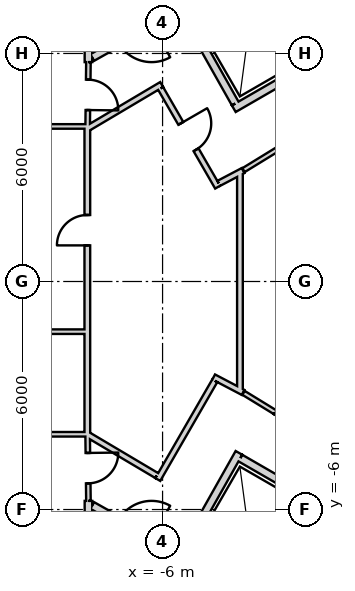
"""IFC4 building model, lengths in metres.
Left out: names, types, materials, properties, quantities, classifications, styles, units other than length and angle.
Written with IfcOpenShell. Run it as: python <this file> out.ifc"""

import sys

from ifc_helpers import new_model, si_unit, direction, frame, frame_2d, origin, place, context, subcontext, project, spatial, rectangle, extrude, element, fill, save


model = new_model("IFC4")
c1 = context("Model", 3, precision=1e-05, world=origin(), true_north=direction((0.0, 1.0)))
c2 = subcontext(c1, "Body", "Model", "MODEL_VIEW")
j1 = project(units=[si_unit("LENGTHUNIT", "METRE"), si_unit("PLANEANGLEUNIT", "RADIAN")], contexts=[c1])
p1 = place(None, origin())
s1 = spatial("IfcSite", under=j1, at=p1, CompositionType="ELEMENT")
p2 = place(p1, origin())
s2 = spatial("IfcBuilding", under=s1, at=p2, CompositionType="ELEMENT")
p3 = place(p2, frame((0.0, 0.0, -11.0)))
s3 = spatial("IfcBuildingStorey", under=s2, at=p3, CompositionType="ELEMENT", Elevation=-11.0)
p4 = place(p3, frame((19.475, 2.208, -0.4), z_axis=(0.0, 0.0, 1.0), x_axis=(-0.866028369851, 0.499994862586, 0.0)))
e1 = element("IfcWall", 1, at=p4, inside=s3, PredefinedType="SHEAR", context=c2, shape_type="SweptSolid", body=[
    extrude(rectangle(XDim=31.523, YDim=0.9, at=frame_2d((15.762, 0.0))), origin(), (0.0, 0.0, 1.0), 5.9),
])
p5 = place(p4, frame((3.612, 0.0, 0.4)))
e2 = element("IfcOpeningElement", 2, at=p5, cuts=e1, PredefinedType="OPENING", context=c2, shape_type="SweptSolid", body=[
    extrude(rectangle(XDim=1.2, YDim=2.4, at=frame_2d((0.6, 1.2))), frame((0.0, 0.46, 0.0), z_axis=(0.0, -1.0, 0.0), x_axis=(1.0, 0.0, 0.0)), (0.0, 0.0, 1.0), 0.92),
])
p6 = place(p4, frame((26.712, 0.0, 0.4)))
e3 = element("IfcOpeningElement", 3, at=p6, cuts=e1, PredefinedType="OPENING", context=c2, shape_type="SweptSolid", body=[
    extrude(rectangle(XDim=1.2, YDim=2.4, at=frame_2d((0.6, 1.2))), frame((0.0, 0.46, 0.0), z_axis=(0.0, -1.0, 0.0), x_axis=(1.0, 0.0, 0.0)), (0.0, 0.0, 1.0), 0.92),
])
p7 = place(p3, frame((-7.825, -17.97, -0.4), z_axis=(0.0, 0.0, 1.0), x_axis=(0.866028369851, 0.499994862586, 0.0)))
e4 = element("IfcWall", 4, at=p7, inside=s3, PredefinedType="SHEAR", context=c2, shape_type="SweptSolid", body=[
    extrude(rectangle(XDim=31.523, YDim=0.9, at=frame_2d((15.762, 0.0))), origin(), (0.0, 0.0, 1.0), 5.9),
])
p8 = place(p7, frame((17.862, 0.0, 0.4)))
e5 = element("IfcOpeningElement", 5, at=p8, cuts=e4, PredefinedType="OPENING", context=c2, shape_type="SweptSolid", body=[
    extrude(rectangle(XDim=1.2, YDim=2.4, at=frame_2d((0.6, 1.2))), frame((0.0, 0.46, 0.0), z_axis=(0.0, -1.0, 0.0), x_axis=(1.0, 0.0, 0.0)), (0.0, 0.0, 1.0), 0.92),
])
p9 = place(p7, frame((20.562, 0.0, 0.4)))
e6 = element("IfcOpeningElement", 6, at=p9, cuts=e4, PredefinedType="OPENING", context=c2, shape_type="SweptSolid", body=[
    extrude(rectangle(XDim=1.2, YDim=2.4, at=frame_2d((0.6, 1.2))), frame((0.0, 0.46, 0.0), z_axis=(0.0, -1.0, 0.0), x_axis=(1.0, 0.0, 0.0)), (0.0, 0.0, 1.0), 0.92),
])
p10 = place(p7, frame((26.712, 0.0, 0.4)))
e7 = element("IfcOpeningElement", 7, at=p10, cuts=e4, PredefinedType="OPENING", context=c2, shape_type="SweptSolid", body=[
    extrude(rectangle(XDim=1.2, YDim=2.4, at=frame_2d((0.6, 1.2))), frame((0.0, 0.46, 0.0), z_axis=(0.0, -1.0, 0.0), x_axis=(1.0, 0.0, 0.0)), (0.0, 0.0, 1.0), 0.92),
])
p11 = place(p7, frame((3.612, 0.0, 0.4)))
e8 = element("IfcOpeningElement", 8, at=p11, cuts=e4, PredefinedType="OPENING", context=c2, shape_type="SweptSolid", body=[
    extrude(rectangle(XDim=1.2, YDim=2.4, at=frame_2d((0.6, 1.2))), frame((0.0, 0.46, 0.0), z_axis=(0.0, -1.0, 0.0), x_axis=(1.0, 0.0, 0.0)), (0.0, 0.0, 1.0), 0.92),
])
p12 = place(p3, frame((-3.538, 8.465, 0.0), z_axis=(0.0, 0.0, 1.0), x_axis=(0.508616218331, -0.860993346345, 0.0)))
e9 = element("IfcWall", 9, at=p12, inside=s3, PredefinedType="PLUMBINGWALL", context=c2, shape_type="SweptSolid", body=[
    extrude(rectangle(XDim=3.2, YDim=0.2, at=frame_2d((1.6, 0.0))), origin(), (0.0, 0.0, 1.0), 5.1),
])
p13 = place(p3, frame((-2.047, 5.746, 0.0), z_axis=(0.0, 0.0, 1.0), x_axis=(-0.866024647952, -0.500001309137, 0.0)))
e10 = element("IfcWall", 10, at=p13, inside=s3, PredefinedType="PLUMBINGWALL", context=c2, shape_type="SweptSolid", body=[
    extrude(rectangle(XDim=2.4, YDim=0.2, at=frame_2d((1.2, 0.0))), origin(), (0.0, 0.0, 1.0), 5.1),
])
p14 = place(p3, frame((-5.562, 7.296, 0.0), z_axis=(0.0, 0.0, 1.0), x_axis=(0.49134651263, -0.870964180966, 0.0)))
e11 = element("IfcWall", 11, at=p14, inside=s3, PredefinedType="PLUMBINGWALL", context=c2, shape_type="SweptSolid", body=[
    extrude(rectangle(XDim=3.0, YDim=0.2, at=frame_2d((1.5, 0.0))), origin(), (0.0, 0.0, 1.0), 5.1),
])
p15 = place(p3, frame((-3.953, -4.646, 0.0), z_axis=(0.0, 0.0, 1.0), x_axis=(0.86605622881, -0.499946605688, 0.0)))
e12 = element("IfcWall", 12, at=p15, inside=s3, PredefinedType="PLUMBINGWALL", context=c2, shape_type="SweptSolid", body=[
    extrude(rectangle(XDim=2.2, YDim=0.2, at=frame_2d((1.1, 0.0))), origin(), (0.0, 0.0, 1.0), 5.1),
])
p16 = place(p3, frame((-1.91, -5.71, 0.0), z_axis=(0.0, 0.0, 1.0), x_axis=(-0.508616218331, -0.860993346345, 0.0)))
e13 = element("IfcWall", 13, at=p16, inside=s3, PredefinedType="PLUMBINGWALL", context=c2, shape_type="SweptSolid", body=[
    extrude(rectangle(XDim=3.2, YDim=0.2, at=frame_2d((1.6, 0.0))), origin(), (0.0, 0.0, 1.0), 5.1),
])
p17 = place(p3, frame((-3.99, -4.509, 0.0), z_axis=(0.0, 0.0, 1.0), x_axis=(-0.491358283181, -0.870957540612, 0.0)))
e14 = element("IfcWall", 14, at=p17, inside=s3, PredefinedType="PLUMBINGWALL", context=c2, shape_type="SweptSolid", body=[
    extrude(rectangle(XDim=3.2, YDim=0.2, at=frame_2d((1.6, 0.0))), origin(), (0.0, 0.0, 1.0), 5.1),
])
p18 = place(p3, frame((-11.2, 4.08, 0.0), z_axis=(0.0, 0.0, 1.0), x_axis=(1.0, 0.0, 0.0)))
e15 = element("IfcWall", 15, at=p18, inside=s3, PredefinedType="PARTITIONING", context=c2, shape_type="SweptSolid", body=[
    extrude(rectangle(XDim=3.25, YDim=0.12, at=frame_2d((1.625, 0.0))), origin(), (0.0, 0.0, 1.0), 5.1),
])
p19 = place(p18, frame((1.225, 0.0, 0.0)))
e16 = element("IfcOpeningElement", 16, at=p19, cuts=e15, PredefinedType="OPENING", context=c2, shape_type="SweptSolid", body=[
    extrude(rectangle(XDim=0.8, YDim=2.1, at=frame_2d((0.4, 1.05))), frame((0.0, 0.07, 0.0), z_axis=(0.0, -1.0, 0.0), x_axis=(1.0, 0.0, 0.0)), (0.0, 0.0, 1.0), 0.14),
])
p20 = place(p3, frame((-7.95, -9.55, 0.0), z_axis=(0.0, 0.0, 1.0), x_axis=(0.0, 1.0, 0.0)))
e17 = element("IfcWall", 17, at=p20, inside=s3, PredefinedType="PARTITIONING", context=c2, shape_type="SweptSolid", body=[
    extrude(rectangle(XDim=3.778, YDim=0.2, at=frame_2d((1.889, 0.0))), origin(), (0.0, 0.0, 1.0), 5.1),
])
p21 = place(p3, frame((-7.95, 5.772, 0.0), z_axis=(0.0, 0.0, 1.0), x_axis=(0.0, 1.0, 0.0)))
e18 = element("IfcWall", 18, at=p21, inside=s3, PredefinedType="PARTITIONING", context=c2, shape_type="SweptSolid", body=[
    extrude(rectangle(XDim=3.578, YDim=0.2, at=frame_2d((1.789, 0.0))), origin(), (0.0, 0.0, 1.0), 5.1),
])
p22 = place(p3, frame((-7.971, 4.05, 0.0), z_axis=(0.0, 0.0, 1.0), x_axis=(0.012047318415, 0.999927428426, 0.0)))
e19 = element("IfcWall", 19, at=p22, inside=s3, PredefinedType="PARTITIONING", context=c2, shape_type="SweptSolid", body=[
    extrude(rectangle(XDim=1.723, YDim=0.12, at=frame_2d((0.861, 0.0))), origin(), (0.0, 0.0, 1.0), 5.1),
])
p23 = place(p22, frame((0.461, 0.0, 0.0)))
e20 = element("IfcOpeningElement", 20, at=p23, cuts=e19, PredefinedType="OPENING", context=c2, shape_type="SweptSolid", body=[
    extrude(rectangle(XDim=0.8, YDim=2.1, at=frame_2d((0.4, 1.05))), frame((0.0, 0.07, 0.0), z_axis=(0.0, -1.0, 0.0), x_axis=(1.0, 0.0, 0.0)), (0.0, 0.0, 1.0), 0.14),
])
p24 = place(p3, frame((-11.2, -1.32, 0.0), z_axis=(0.0, 0.0, 1.0), x_axis=(1.0, 0.0, 0.0)))
e21 = element("IfcWall", 21, at=p24, inside=s3, PredefinedType="PARTITIONING", context=c2, shape_type="SweptSolid", body=[
    extrude(rectangle(XDim=3.25, YDim=0.12, at=frame_2d((1.625, 0.0))), origin(), (0.0, 0.0, 1.0), 5.1),
])
p25 = place(p24, frame((1.225, 0.0, 0.0)))
e22 = element("IfcOpeningElement", 22, at=p25, cuts=e21, PredefinedType="OPENING", context=c2, shape_type="SweptSolid", body=[
    extrude(rectangle(XDim=0.8, YDim=2.1, at=frame_2d((0.4, 1.05))), frame((0.0, 0.07, 0.0), z_axis=(0.0, -1.0, 0.0), x_axis=(1.0, 0.0, 0.0)), (0.0, 0.0, 1.0), 0.14),
])
p26 = place(p3, frame((-7.98, 4.05, 0.0), z_axis=(0.0, 0.0, 1.0), x_axis=(0.0, -1.0, 0.0)))
e23 = element("IfcWall", 23, at=p26, inside=s3, PredefinedType="PLUMBINGWALL", context=c2, shape_type="SweptSolid", body=[
    extrude(rectangle(XDim=8.1, YDim=0.15, at=frame_2d((4.05, 0.0))), origin(), (0.0, 0.0, 1.0), 5.1),
])
p27 = place(p26, frame((2.3, 0.0, 0.0)))
e24 = element("IfcOpeningElement", 24, at=p27, cuts=e23, PredefinedType="OPENING", context=c2, shape_type="SweptSolid", body=[
    extrude(rectangle(XDim=0.8, YDim=2.1, at=frame_2d((0.4, 1.05))), frame((0.0, 0.085, 0.0), z_axis=(0.0, -1.0, 0.0), x_axis=(1.0, 0.0, 0.0)), (0.0, 0.0, 1.0), 0.17),
])
p28 = place(p3, frame((-7.95, -4.02, 0.0), z_axis=(0.0, 0.0, 1.0), x_axis=(-1.0, 0.0, 0.0)))
e25 = element("IfcWall", 25, at=p28, inside=s3, PredefinedType="PARTITIONING", context=c2, shape_type="SweptSolid", body=[
    extrude(rectangle(XDim=3.25, YDim=0.12, at=frame_2d((1.625, 0.0))), origin(), (0.0, 0.0, 1.0), 5.1),
])
p29 = place(p3, frame((-7.951, -5.772, 0.0), z_axis=(0.0, 0.0, 1.0), x_axis=(-0.012047318415, 0.999927428426, 0.0)))
e26 = element("IfcWall", 26, at=p29, inside=s3, PredefinedType="PARTITIONING", context=c2, shape_type="SweptSolid", body=[
    extrude(rectangle(XDim=1.723, YDim=0.12, at=frame_2d((0.861, 0.0))), origin(), (0.0, 0.0, 1.0), 5.1),
])
p30 = place(p29, frame((0.461, 0.0, 0.0)))
e27 = element("IfcOpeningElement", 27, at=p30, cuts=e26, PredefinedType="OPENING", context=c2, shape_type="SweptSolid", body=[
    extrude(rectangle(XDim=0.8, YDim=2.1, at=frame_2d((0.4, 1.05))), frame((0.0, 0.07, 0.0), z_axis=(0.0, -1.0, 0.0), x_axis=(1.0, 0.0, 0.0)), (0.0, 0.0, 1.0), 0.14),
])
p31 = place(p3, frame((-5.6, 7.16, 0.0), z_axis=(0.0, 0.0, 1.0), x_axis=(-0.871350695252, -0.490660744185, 0.0)))
e28 = element("IfcWall", 28, at=p31, inside=s3, PredefinedType="PARTITIONING", context=c2, shape_type="SweptSolid", body=[
    extrude(rectangle(XDim=2.582, YDim=0.2, at=frame_2d((1.291, 0.0))), origin(), (0.0, 0.0, 1.0), 5.1),
])
p32 = place(p31, frame((0.791, 0.0, 0.0)))
e29 = element("IfcOpeningElement", 29, at=p32, cuts=e28, PredefinedType="OPENING", context=c2, shape_type="SweptSolid", body=[
    extrude(rectangle(XDim=1.0, YDim=2.1, at=frame_2d((0.5, 1.05))), frame((0.0, 0.11, 0.0), z_axis=(0.0, -1.0, 0.0), x_axis=(1.0, 0.0, 0.0)), (0.0, 0.0, 1.0), 0.22),
])
p33 = place(p3, frame((-7.85, -5.893, 0.0), z_axis=(0.0, 0.0, 1.0), x_axis=(0.871350695252, -0.490660744185, 0.0)))
e30 = element("IfcWall", 30, at=p33, inside=s3, PredefinedType="PARTITIONING", context=c2, shape_type="SweptSolid", body=[
    extrude(rectangle(XDim=2.582, YDim=0.2, at=frame_2d((1.291, 0.0))), origin(), (0.0, 0.0, 1.0), 5.1),
])
p34 = place(p33, frame((0.791, 0.0, 0.0)))
e31 = element("IfcOpeningElement", 31, at=p34, cuts=e30, PredefinedType="OPENING", context=c2, shape_type="SweptSolid", body=[
    extrude(rectangle(XDim=1.0, YDim=2.1, at=frame_2d((0.5, 1.05))), frame((0.0, 0.11, 0.0), z_axis=(0.0, -1.0, 0.0), x_axis=(1.0, 0.0, 0.0)), (0.0, 0.0, 1.0), 0.22),
])
p35 = place(p3, frame((-3.964, -2.908, 0.0), z_axis=(0.0, 0.0, 1.0), x_axis=(0.0, 1.0, 0.0)))
e32 = element("IfcWall", 32, at=p35, inside=s3, PredefinedType="PLUMBINGWALL", context=c2, shape_type="SweptSolid", body=[
    extrude(rectangle(XDim=5.815, YDim=0.15, at=frame_2d((2.908, 0.0))), origin(), (0.0, 0.0, 1.0), 5.1),
])
p36 = place(p3, frame((-4.655, -2.512, 0.0), z_axis=(0.0, 0.0, 1.0), x_axis=(0.885372046241, -0.464883146323, 0.0)))
e33 = element("IfcWall", 33, at=p36, inside=s3, PredefinedType="PLUMBINGWALL", context=c2, shape_type="SweptSolid", body=[
    extrude(rectangle(XDim=0.875, YDim=0.15, at=frame_2d((0.437, 0.0))), origin(), (0.0, 0.0, 1.0), 5.1),
])
p37 = place(p3, frame((-6.126, -5.21, 0.0), z_axis=(0.0, 0.0, 1.0), x_axis=(0.499990139034, 0.866031096941, 0.0)))
e34 = element("IfcWall", 34, at=p37, inside=s3, PredefinedType="PLUMBINGWALL", context=c2, shape_type="SweptSolid", body=[
    extrude(rectangle(XDim=3.0, YDim=0.15, at=frame_2d((1.5, 0.0))), origin(), (0.0, 0.0, 1.0), 5.1),
])
p38 = place(p3, frame((-7.95, -4.041, 0.0), z_axis=(0.0, 0.0, 1.0), x_axis=(0.860090281069, -0.510141851263, 0.0)))
e35 = element("IfcWall", 35, at=p38, inside=s3, PredefinedType="PLUMBINGWALL", context=c2, shape_type="SweptSolid", body=[
    extrude(rectangle(XDim=2.089, YDim=0.15, at=frame_2d((1.045, 0.0))), origin(), (0.0, 0.0, 1.0), 5.1),
])
p39 = place(p3, frame((-6.024, 5.183, 0.0), z_axis=(0.0, 0.0, 1.0), x_axis=(-0.860126804455, -0.510080268447, 0.0)))
e36 = element("IfcWall", 36, at=p39, inside=s3, PredefinedType="PLUMBINGWALL", context=c2, shape_type="SweptSolid", body=[
    extrude(rectangle(XDim=2.24, YDim=0.15, at=frame_2d((1.12, 0.0))), origin(), (0.0, 0.0, 1.0), 5.1),
])
p40 = place(p3, frame((-4.551, 2.482, 0.0), z_axis=(0.0, 0.0, 1.0), x_axis=(-0.499990139034, 0.866031096941, 0.0)))
e37 = element("IfcWall", 37, at=p40, inside=s3, PredefinedType="PLUMBINGWALL", context=c2, shape_type="SweptSolid", body=[
    extrude(rectangle(XDim=3.0, YDim=0.15, at=frame_2d((1.5, 0.0))), origin(), (0.0, 0.0, 1.0), 5.1),
])
p41 = place(p40, frame((1.137, 0.0, 0.0)))
e38 = element("IfcOpeningElement", 38, at=p41, cuts=e37, PredefinedType="OPENING", context=c2, shape_type="SweptSolid", body=[
    extrude(rectangle(XDim=0.8, YDim=2.1, at=frame_2d((0.4, 1.05))), frame((0.0, 0.085, 0.0), z_axis=(0.0, -1.0, 0.0), x_axis=(1.0, 0.0, 0.0)), (0.0, 0.0, 1.0), 0.17),
])
p42 = place(p3, frame((-3.881, 2.919, 0.0), z_axis=(0.0, 0.0, 1.0), x_axis=(-0.885422176933, -0.464787659684, 0.0)))
e39 = element("IfcWall", 39, at=p42, inside=s3, PredefinedType="PLUMBINGWALL", context=c2, shape_type="SweptSolid", body=[
    extrude(rectangle(XDim=0.724, YDim=0.15, at=frame_2d((0.362, 0.0))), origin(), (0.0, 0.0, 1.0), 5.1),
])
p43 = place(p3, frame((-2.935, 3.503, 0.0), z_axis=(0.0, 0.0, 1.0), x_axis=(-0.852482838041, -0.522755211209, 0.0)))
e40 = element("IfcWall", 40, at=p43, inside=s3, PredefinedType="PARTITIONING", context=c2, shape_type="SweptSolid", body=[
    extrude(rectangle(XDim=1.097, YDim=0.12, at=frame_2d((0.548, 0.0))), origin(), (0.0, 0.0, 1.0), 5.1),
])
p44 = place(p3, frame((-3.016, -3.524, 0.0), z_axis=(0.0, 0.0, 1.0), x_axis=(0.499988681553, 0.866031938394, 0.0)))
e41 = element("IfcWall", 41, at=p44, inside=s3, PredefinedType="PARTITIONING", context=c2, shape_type="SweptSolid", body=[
    extrude(rectangle(XDim=3.069, YDim=0.12, at=frame_2d((1.535, 0.0))), origin(), (0.0, 0.0, 1.0), 5.1),
])
p45 = place(p44, frame((1.165, 0.0, 0.0)))
e42 = element("IfcOpeningElement", 42, at=p45, cuts=e41, PredefinedType="OPENING", context=c2, shape_type="SweptSolid", body=[
    extrude(rectangle(XDim=0.8, YDim=2.1, at=frame_2d((0.4, 1.05))), frame((0.0, 0.07, 0.0), z_axis=(0.0, -1.0, 0.0), x_axis=(1.0, 0.0, 0.0)), (0.0, 0.0, 1.0), 0.14),
])
p46 = place(p3, frame((-3.87, -2.93, 0.0), z_axis=(0.0, 0.0, 1.0), x_axis=(0.852489850103, -0.522743776119, 0.0)))
e43 = element("IfcWall", 43, at=p46, inside=s3, PredefinedType="PARTITIONING", context=c2, shape_type="SweptSolid", body=[
    extrude(rectangle(XDim=0.977, YDim=0.12, at=frame_2d((0.488, 0.0))), origin(), (0.0, 0.0, 1.0), 5.1),
])
p47 = place(p3, frame((30.376, 1.169, 0.0), z_axis=(0.0, 0.0, 1.0), x_axis=(-0.865777000343, 0.500430000777, 0.0)))
e44 = element("IfcWall", 44, at=p47, inside=s3, PredefinedType="PARTITIONING", context=c2, shape_type="SweptSolid", body=[
    extrude(rectangle(XDim=39.978, YDim=0.12, at=frame_2d((19.989, 0.0))), origin(), (0.0, 0.0, 1.0), 4.18),
])
p48 = place(p47, frame((28.784, 0.0, 0.0)))
e45 = element("IfcOpeningElement", 45, at=p48, cuts=e44, PredefinedType="OPENING", context=c2, shape_type="SweptSolid", body=[
    extrude(rectangle(XDim=1.2, YDim=2.4, at=frame_2d((0.6, 1.2))), frame((0.0, 0.07, 0.0), z_axis=(0.0, -1.0, 0.0), x_axis=(1.0, 0.0, 0.0)), (0.0, 0.0, 1.0), 0.14),
])
p49 = place(p47, frame((9.984, 0.0, 0.0)))
e46 = element("IfcOpeningElement", 46, at=p49, cuts=e44, PredefinedType="OPENING", context=c2, shape_type="SweptSolid", body=[
    extrude(rectangle(XDim=1.2, YDim=2.4, at=frame_2d((0.6, 1.2))), frame((0.0, 0.07, 0.0), z_axis=(0.0, -1.0, 0.0), x_axis=(1.0, 0.0, 0.0)), (0.0, 0.0, 1.0), 0.14),
])
p50 = place(p41, origin())
e47 = element("IfcDoor", 47, at=p50, inside=s3, OperationType="SINGLE_SWING_RIGHT", PredefinedType="USERDEFINED", context=c2, shape_type="SweptSolid", body=[
    extrude(rectangle(XDim=0.8, YDim=2.1, at=frame_2d((0.4, 1.05))), frame((0.0, 0.025, 0.0), z_axis=(0.0, -1.0, 0.0), x_axis=(1.0, 0.0, 0.0)), (0.0, 0.0, 1.0), 0.05),
])
fill(e38, e47)
p51 = place(p23, origin())
e48 = element("IfcDoor", 48, at=p51, inside=s3, OperationType="SINGLE_SWING_LEFT", PredefinedType="USERDEFINED", context=c2, shape_type="SweptSolid", body=[
    extrude(rectangle(XDim=0.8, YDim=2.1, at=frame_2d((0.4, 1.05))), frame((0.0, 0.025, 0.0), z_axis=(0.0, -1.0, 0.0), x_axis=(1.0, 0.0, 0.0)), (0.0, 0.0, 1.0), 0.05),
])
fill(e20, e48)
p52 = place(p30, origin())
e49 = element("IfcDoor", 49, at=p52, inside=s3, OperationType="SINGLE_SWING_RIGHT", PredefinedType="USERDEFINED", context=c2, shape_type="SweptSolid", body=[
    extrude(rectangle(XDim=0.8, YDim=2.1, at=frame_2d((0.4, 1.05))), frame((0.0, 0.025, 0.0), z_axis=(0.0, -1.0, 0.0), x_axis=(1.0, 0.0, 0.0)), (0.0, 0.0, 1.0), 0.05),
])
fill(e27, e49)
p53 = place(p27, origin())
e50 = element("IfcDoor", 50, at=p53, inside=s3, OperationType="SINGLE_SWING_RIGHT", PredefinedType="USERDEFINED", context=c2, shape_type="SweptSolid", body=[
    extrude(rectangle(XDim=0.8, YDim=2.1, at=frame_2d((0.4, 1.05))), frame((0.0, 0.025, 0.0), z_axis=(0.0, -1.0, 0.0), x_axis=(1.0, 0.0, 0.0)), (0.0, 0.0, 1.0), 0.05),
])
fill(e24, e50)
save(model, sys.argv[1])
